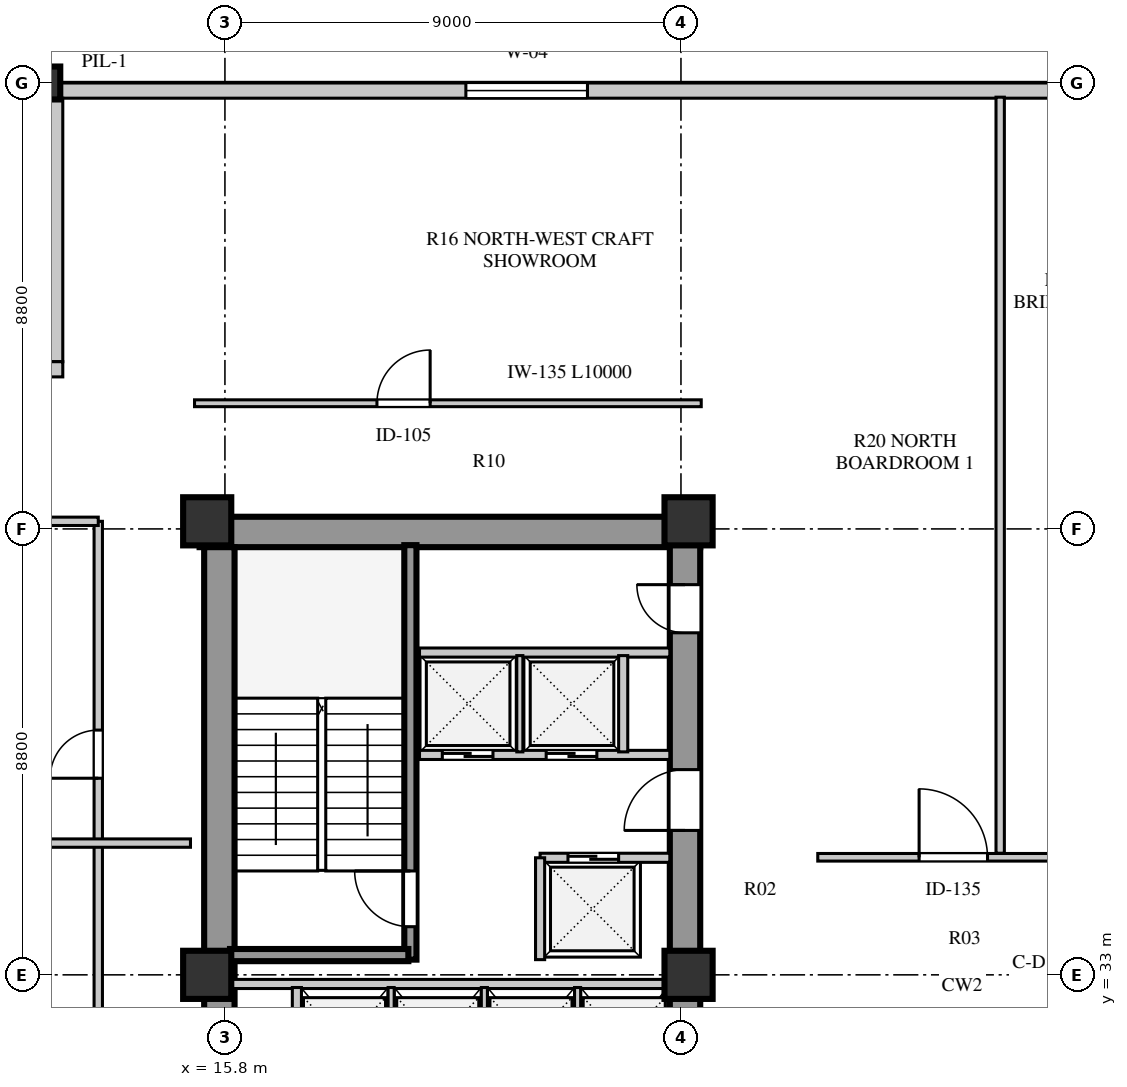
"""IFC4 building model, lengths in metres.
Left out: names, types, materials, properties, quantities, classifications, styles, units other than length and angle.
Written with IfcOpenShell. Run it as: python <this file> out.ifc"""

import sys

from ifc_helpers import new_model, si_unit, direction, frame, frame_2d, origin, origin_2d, place, context, subcontext, project, spatial, rectangle, extrude, element, fill, save


model = new_model("IFC4")
c1 = context("Model", 3, precision=1e-05, world=origin(), true_north=direction((0.0, 1.0)))
c2 = subcontext(c1, "Body", "Model", "MODEL_VIEW")
j1 = project(units=[si_unit("LENGTHUNIT", "METRE"), si_unit("PLANEANGLEUNIT", "RADIAN")], contexts=[c1])
p1 = place(None, origin())
s1 = spatial("IfcSite", under=j1, at=p1, CompositionType="ELEMENT")
p2 = place(p1, origin())
s2 = spatial("IfcBuilding", under=s1, at=p2, CompositionType="ELEMENT")
p3 = place(p2, frame((0.0, 0.0, 17.0)))
s3 = spatial("IfcBuildingStorey", under=s2, at=p3, CompositionType="ELEMENT", Elevation=17.0)
p4 = place(p3, frame((15.3, 41.74, 0.0), z_axis=(0.0, 0.0, 1.0), x_axis=(1.0, 0.0, 0.0)))
e1 = element("IfcWall", 1, at=p4, inside=s3, PredefinedType="SHEAR", context=c2, shape_type="SweptSolid", body=[
    extrude(rectangle(XDim=9.88, YDim=0.6, at=frame_2d((4.94, 0.0))), origin(), (0.0, 0.0, 1.0), 4.22),
])
p5 = place(p3, frame((15.69, 15.81, 0.0), z_axis=(0.0, 0.0, 1.0), x_axis=(0.0, 1.0, 0.0)))
e2 = element("IfcWall", 2, at=p5, inside=s3, PredefinedType="SHEAR", context=c2, shape_type="SweptSolid", body=[
    extrude(rectangle(XDim=25.63, YDim=0.6, at=frame_2d((12.815, 0.0))), origin(), (0.0, 0.0, 1.0), 4.22),
])
p6 = place(p3, frame((24.88, 15.74, 0.0), z_axis=(0.0, 0.0, 1.0), x_axis=(0.0, 1.0, 0.0)))
e3 = element("IfcWall", 3, at=p6, inside=s3, PredefinedType="SHEAR", context=c2, shape_type="SweptSolid", body=[
    extrude(rectangle(XDim=25.76, YDim=0.6, at=frame_2d((12.88, 0.0))), origin(), (0.0, 0.0, 1.0), 4.22),
])
p7 = place(p6, frame((1.61, 0.0, 0.0)))
e4 = element("IfcOpeningElement", 4, at=p7, cuts=e3, PredefinedType="OPENING", context=c2, shape_type="SweptSolid", body=[
    extrude(rectangle(XDim=1.2, YDim=2.1, at=frame_2d((0.6, 1.05))), frame((0.0, 0.31, 0.0), z_axis=(0.0, -1.0, 0.0), x_axis=(1.0, 0.0, 0.0)), (0.0, 0.0, 1.0), 0.62),
])
p8 = place(p6, frame((6.78, 0.0, 0.0)))
e5 = element("IfcOpeningElement", 5, at=p8, cuts=e3, PredefinedType="OPENING", context=c2, shape_type="SweptSolid", body=[
    extrude(rectangle(XDim=0.85, YDim=2.06, at=frame_2d((0.425, 1.03))), frame((0.0, 0.31, 0.0), z_axis=(0.0, -1.0, 0.0), x_axis=(1.0, 0.0, 0.0)), (0.0, 0.0, 1.0), 0.62),
])
p9 = place(p6, frame((12.11, 0.0, 0.0)))
e6 = element("IfcOpeningElement", 6, at=p9, cuts=e3, PredefinedType="OPENING", context=c2, shape_type="SweptSolid", body=[
    extrude(rectangle(XDim=1.5, YDim=2.12, at=frame_2d((0.75, 1.06))), frame((0.0, 0.31, 0.0), z_axis=(0.0, -1.0, 0.0), x_axis=(1.0, 0.0, 0.0)), (0.0, 0.0, 1.0), 0.62),
])
p10 = place(p6, frame((20.11, 0.0, 0.0)))
e7 = element("IfcOpeningElement", 7, at=p10, cuts=e3, PredefinedType="OPENING", context=c2, shape_type="SweptSolid", body=[
    extrude(rectangle(XDim=1.2, YDim=2.12, at=frame_2d((0.6, 1.06))), frame((0.0, 0.31, 0.0), z_axis=(0.0, -1.0, 0.0), x_axis=(1.0, 0.0, 0.0)), (0.0, 0.0, 1.0), 0.62),
])
p11 = place(p6, frame((24.01, 0.0, 0.0)))
e8 = element("IfcOpeningElement", 8, at=p11, cuts=e3, PredefinedType="OPENING", context=c2, shape_type="SweptSolid", body=[
    extrude(rectangle(XDim=0.95, YDim=2.1, at=frame_2d((0.475, 1.05))), frame((0.0, 0.31, 0.0), z_axis=(0.0, -1.0, 0.0), x_axis=(1.0, 0.0, 0.0)), (0.0, 0.0, 1.0), 0.62),
])
for number, where, z_axis, x_axis in (
    (9, (15.45, 33.0, 0.0), (0.0, 0.0, 1.0), (1.0, 0.0, 0.0)),
    (10, (15.45, 41.95, 0.0), (0.0, 0.0, 1.0), (1.0, 0.0, 0.0)),
    (11, (24.95, 33.0, 0.0), (0.0, 0.0, 1.0), (1.0, 0.0, 0.0)),
    (12, (24.95, 41.95, 0.0), (0.0, 0.0, 1.0), (1.0, 0.0, 0.0)),
):
    element("IfcColumn", number, at=place(p3, frame(where, z_axis=z_axis, x_axis=x_axis)), inside=s3, PredefinedType="COLUMN", context=c2, shape_type="SweptSolid", body=[
        extrude(rectangle(XDim=0.95, YDim=0.95, at=origin_2d()), origin(), (0.0, 0.0, 1.0), 4.22),
    ])
p12 = place(p3, frame((12.3, 50.6, 0.0), z_axis=(0.0, 0.0, 1.0), x_axis=(1.0, 0.0, 0.0)))
e13 = element("IfcColumn", 13, at=p12, inside=s3, PredefinedType="PILASTER", context=c2, shape_type="SweptSolid", body=[
    extrude(rectangle(XDim=0.5, YDim=0.65, at=origin_2d()), origin(), (0.0, 0.0, 1.0), 4.22),
])
p13 = place(p3, frame((46.3, 50.45, 0.0), z_axis=(0.0, 0.0, 1.0), x_axis=(-1.0, 0.0, 0.0)))
e14 = element("IfcWall", 14, at=p13, inside=s3, PredefinedType="STANDARD", context=c2, shape_type="SweptSolid", body=[
    extrude(rectangle(XDim=34.0, YDim=0.3, at=frame_2d((17.0, 0.0))), origin(), (0.0, 0.0, 1.0), 4.22),
])
p14 = place(p13, frame((23.345, 0.0, 0.8)))
e15 = element("IfcOpeningElement", 15, at=p14, cuts=e14, PredefinedType="OPENING", context=c2, shape_type="SweptSolid", body=[
    extrude(rectangle(XDim=2.4, YDim=2.05, at=frame_2d((1.2, 1.025))), frame((0.0, 0.16, 0.0), z_axis=(0.0, -1.0, 0.0), x_axis=(1.0, 0.0, 0.0)), (0.0, 0.0, 1.0), 0.32),
])
p15 = place(p13, frame((6.605, 0.0, 0.8)))
e16 = element("IfcOpeningElement", 16, at=p15, cuts=e14, PredefinedType="OPENING", context=c2, shape_type="SweptSolid", body=[
    extrude(rectangle(XDim=2.1, YDim=1.95, at=frame_2d((1.05, 0.975))), frame((0.0, 0.16, 0.0), z_axis=(0.0, -1.0, 0.0), x_axis=(1.0, 0.0, 0.0)), (0.0, 0.0, 1.0), 0.32),
])
p16 = place(p3, frame((12.45, 50.3, 0.0), z_axis=(0.0, 0.0, 1.0), x_axis=(0.0, -1.0, 0.0)))
e17 = element("IfcWall", 17, at=p16, inside=s3, PredefinedType="STANDARD", context=c2, shape_type="SweptSolid", body=[
    extrude(rectangle(XDim=5.2, YDim=0.3, at=frame_2d((2.6, 0.0))), origin(), (0.0, 0.0, 1.0), 4.22),
])
p17 = place(p3, frame((12.6, 44.95, 0.0), z_axis=(0.0, 0.0, 1.0), x_axis=(-1.0, 0.0, 0.0)))
e18 = element("IfcWall", 18, at=p17, inside=s3, PredefinedType="STANDARD", context=c2, shape_type="SweptSolid", body=[
    extrude(rectangle(XDim=5.8, YDim=0.3, at=frame_2d((2.9, 0.0))), origin(), (0.0, 0.0, 1.0), 4.22),
])
p18 = place(p3, frame((15.9, 32.82, 0.0), z_axis=(0.0, 0.0, 1.0), x_axis=(1.0, 0.0, 0.0)))
e19 = element("IfcWall", 19, at=p18, inside=s3, PredefinedType="SOLIDWALL", context=c2, shape_type="SweptSolid", body=[
    extrude(rectangle(XDim=8.68, YDim=0.18, at=frame_2d((4.34, 0.0))), origin(), (0.0, 0.0, 1.0), 3.42),
])
p19 = place(p3, frame((17.22, 30.7, 0.0), z_axis=(0.0, 0.0, 1.0), x_axis=(0.0, 1.0, 0.0)))
e20 = element("IfcWall", 20, at=p19, inside=s3, PredefinedType="SOLIDWALL", context=c2, shape_type="SweptSolid", body=[
    extrude(rectangle(XDim=2.05, YDim=0.18, at=frame_2d((1.025, 0.0))), origin(), (0.0, 0.0, 1.0), 4.22),
])
for number, where, z_axis, x_axis in (
    (21, (19.08, 30.7, 0.0), (0.0, 0.0, 1.0), (0.0, 1.0, 0.0)),
    (22, (20.92, 30.7, 0.0), (0.0, 0.0, 1.0), (0.0, 1.0, 0.0)),
    (23, (22.76, 30.7, 0.0), (0.0, 0.0, 1.0), (0.0, 1.0, 0.0)),
):
    element("IfcWall", number, at=place(p3, frame(where, z_axis=z_axis, x_axis=x_axis)), inside=s3, PredefinedType="PARTITIONING", context=c2, shape_type="SweptSolid", body=[
        extrude(rectangle(XDim=2.05, YDim=0.12, at=frame_2d((1.025, 0.0))), origin(), (0.0, 0.0, 1.0), 4.22),
    ])
p20 = place(p3, frame((19.46, 33.3, 0.0), z_axis=(0.0, 0.0, 1.0), x_axis=(0.0, 1.0, 0.0)))
e24 = element("IfcWall", 24, at=p20, inside=s3, PredefinedType="SHEAR", context=c2, shape_type="SweptSolid", body=[
    extrude(rectangle(XDim=8.18, YDim=0.24, at=frame_2d((4.09, 0.0))), origin(), (0.0, 0.0, 1.0), 4.5),
])
p21 = place(p20, frame((0.65, 0.0, 0.0)))
e25 = element("IfcOpeningElement", 25, at=p21, cuts=e24, PredefinedType="OPENING", context=c2, shape_type="SweptSolid", body=[
    extrude(rectangle(XDim=1.1, YDim=2.1, at=frame_2d((0.55, 1.05))), frame((0.0, 0.13, 0.0), z_axis=(0.0, -1.0, 0.0), x_axis=(1.0, 0.0, 0.0)), (0.0, 0.0, 1.0), 0.26),
])
p22 = place(p3, frame((15.9, 33.39, 0.0), z_axis=(0.0, 0.0, 1.0), x_axis=(1.0, 0.0, 0.0)))
e26 = element("IfcWall", 26, at=p22, inside=s3, PredefinedType="SHEAR", context=c2, shape_type="SweptSolid", body=[
    extrude(rectangle(XDim=3.52, YDim=0.24, at=frame_2d((1.76, 0.0))), origin(), (0.0, 0.0, 1.0), 4.5),
])
p23 = place(p3, frame((22.02, 35.31, 0.0), z_axis=(0.0, 0.0, 1.0), x_axis=(1.0, 0.0, 0.0)))
e27 = element("IfcWall", 27, at=p23, inside=s3, PredefinedType="SOLIDWALL", context=c2, shape_type="SweptSolid", body=[
    extrude(rectangle(XDim=2.56, YDim=0.18, at=frame_2d((1.28, 0.0))), origin(), (0.0, 0.0, 1.0), 4.22),
])
p24 = place(p23, frame((0.55, 0.0, 0.0)))
e28 = element("IfcOpeningElement", 28, at=p24, cuts=e27, PredefinedType="OPENING", context=c2, shape_type="SweptSolid", body=[
    extrude(rectangle(XDim=1.0, YDim=2.1, at=frame_2d((0.5, 1.05))), frame((0.0, 0.1, 0.0), z_axis=(0.0, -1.0, 0.0), x_axis=(1.0, 0.0, 0.0)), (0.0, 0.0, 1.0), 0.2),
])
p25 = place(p3, frame((22.02, 33.3, 0.0), z_axis=(0.0, 0.0, 1.0), x_axis=(0.0, 1.0, 0.0)))
e29 = element("IfcWall", 29, at=p25, inside=s3, PredefinedType="SOLIDWALL", context=c2, shape_type="SweptSolid", body=[
    extrude(rectangle(XDim=2.01, YDim=0.18, at=frame_2d((1.005, 0.0))), origin(), (0.0, 0.0, 1.0), 4.22),
])
p26 = place(p3, frame((19.64, 37.34, 0.0), z_axis=(0.0, 0.0, 1.0), x_axis=(1.0, 0.0, 0.0)))
e30 = element("IfcWall", 30, at=p26, inside=s3, PredefinedType="SOLIDWALL", context=c2, shape_type="SweptSolid", body=[
    extrude(rectangle(XDim=4.94, YDim=0.18, at=frame_2d((2.47, 0.0))), origin(), (0.0, 0.0, 1.0), 4.22),
])
p27 = place(p26, frame((0.45, 0.0, 0.0)))
e31 = element("IfcOpeningElement", 31, at=p27, cuts=e30, PredefinedType="OPENING", context=c2, shape_type="SweptSolid", body=[
    extrude(rectangle(XDim=1.0, YDim=2.1, at=frame_2d((0.5, 1.05))), frame((0.0, 0.1, 0.0), z_axis=(0.0, -1.0, 0.0), x_axis=(1.0, 0.0, 0.0)), (0.0, 0.0, 1.0), 0.2),
])
p28 = place(p26, frame((2.5, 0.0, 0.0)))
e32 = element("IfcOpeningElement", 32, at=p28, cuts=e30, PredefinedType="OPENING", context=c2, shape_type="SweptSolid", body=[
    extrude(rectangle(XDim=1.0, YDim=2.1, at=frame_2d((0.5, 1.05))), frame((0.0, 0.1, 0.0), z_axis=(0.0, -1.0, 0.0), x_axis=(1.0, 0.0, 0.0)), (0.0, 0.0, 1.0), 0.2),
])
p29 = place(p3, frame((19.64, 39.36, 0.0), z_axis=(0.0, 0.0, 1.0), x_axis=(1.0, 0.0, 0.0)))
e33 = element("IfcWall", 33, at=p29, inside=s3, PredefinedType="SOLIDWALL", context=c2, shape_type="SweptSolid", body=[
    extrude(rectangle(XDim=4.94, YDim=0.18, at=frame_2d((2.47, 0.0))), origin(), (0.0, 0.0, 1.0), 4.22),
])
p30 = place(p3, frame((21.62, 37.4, 0.0), z_axis=(0.0, 0.0, 1.0), x_axis=(0.0, 1.0, 0.0)))
e34 = element("IfcWall", 34, at=p30, inside=s3, PredefinedType="PARTITIONING", context=c2, shape_type="SweptSolid", body=[
    extrude(rectangle(XDim=1.9, YDim=0.12, at=frame_2d((0.95, 0.0))), origin(), (0.0, 0.0, 1.0), 4.22),
])
p31 = place(p3, frame((23.66, 37.4, 0.0), z_axis=(0.0, 0.0, 1.0), x_axis=(0.0, 1.0, 0.0)))
e35 = element("IfcWall", 35, at=p31, inside=s3, PredefinedType="SOLIDWALL", context=c2, shape_type="SweptSolid", body=[
    extrude(rectangle(XDim=1.9, YDim=0.18, at=frame_2d((0.95, 0.0))), origin(), (0.0, 0.0, 1.0), 4.22),
])
p32 = place(p3, frame((13.3, 15.25, 0.0), z_axis=(0.0, 0.0, 1.0), x_axis=(0.0, 1.0, 0.0)))
e36 = element("IfcWall", 36, at=p32, inside=s3, PredefinedType="PARTITIONING", context=c2, shape_type="SweptSolid", body=[
    extrude(rectangle(XDim=26.7, YDim=0.165, at=frame_2d((13.35, 0.0))), origin(), (0.0, 0.0, 1.0), 4.22),
])
p33 = place(p32, frame((1.3, 0.0, 0.0)))
e37 = element("IfcOpeningElement", 37, at=p33, cuts=e36, PredefinedType="OPENING", context=c2, shape_type="SweptSolid", body=[
    extrude(rectangle(XDim=0.95, YDim=2.08, at=frame_2d((0.475, 1.04))), frame((0.0, 0.093, 0.0), z_axis=(0.0, -1.0, 0.0), x_axis=(1.0, 0.0, 0.0)), (0.0, 0.0, 1.0), 0.185),
])
p34 = place(p32, frame((7.63, 0.0, 0.0)))
e38 = element("IfcOpeningElement", 38, at=p34, cuts=e36, PredefinedType="OPENING", context=c2, shape_type="SweptSolid", body=[
    extrude(rectangle(XDim=0.95, YDim=2.08, at=frame_2d((0.475, 1.04))), frame((0.0, 0.093, 0.0), z_axis=(0.0, -1.0, 0.0), x_axis=(1.0, 0.0, 0.0)), (0.0, 0.0, 1.0), 0.185),
])
p35 = place(p32, frame((14.63, 0.0, 0.0)))
e39 = element("IfcOpeningElement", 39, at=p35, cuts=e36, PredefinedType="OPENING", context=c2, shape_type="SweptSolid", body=[
    extrude(rectangle(XDim=0.95, YDim=2.08, at=frame_2d((0.475, 1.04))), frame((0.0, 0.093, 0.0), z_axis=(0.0, -1.0, 0.0), x_axis=(1.0, 0.0, 0.0)), (0.0, 0.0, 1.0), 0.185),
])
p36 = place(p32, frame((21.63, 0.0, 0.0)))
e40 = element("IfcOpeningElement", 40, at=p36, cuts=e36, PredefinedType="OPENING", context=c2, shape_type="SweptSolid", body=[
    extrude(rectangle(XDim=0.95, YDim=2.08, at=frame_2d((0.475, 1.04))), frame((0.0, 0.093, 0.0), z_axis=(0.0, -1.0, 0.0), x_axis=(1.0, 0.0, 0.0)), (0.0, 0.0, 1.0), 0.185),
])
p37 = place(p3, frame((6.88, 41.95, 0.0), z_axis=(0.0, 0.0, 1.0), x_axis=(1.0, 0.0, 0.0)))
e41 = element("IfcWall", 41, at=p37, inside=s3, PredefinedType="PARTITIONING", context=c2, shape_type="SweptSolid", body=[
    extrude(rectangle(XDim=6.42, YDim=0.165, at=frame_2d((3.21, 0.0))), origin(), (0.0, 0.0, 1.0), 3.72),
])
p38 = place(p3, frame((15.2, 44.28, 0.0), z_axis=(0.0, 0.0, 1.0), x_axis=(1.0, 0.0, 0.0)))
e42 = element("IfcWall", 42, at=p38, inside=s3, PredefinedType="PARTITIONING", context=c2, shape_type="SweptSolid", body=[
    extrude(rectangle(XDim=10.0, YDim=0.135, at=frame_2d((5.0, 0.0))), origin(), (0.0, 0.0, 1.0), 4.22),
])
p39 = place(p38, frame((3.6, 0.0, 0.0)))
e43 = element("IfcOpeningElement", 43, at=p39, cuts=e42, PredefinedType="OPENING", context=c2, shape_type="SweptSolid", body=[
    extrude(rectangle(XDim=1.05, YDim=2.1, at=frame_2d((0.525, 1.05))), frame((0.0, 0.078, 0.0), z_axis=(0.0, -1.0, 0.0), x_axis=(1.0, 0.0, 0.0)), (0.0, 0.0, 1.0), 0.155),
])
p40 = place(p3, frame((27.5, 35.32, 0.0), z_axis=(0.0, 0.0, 1.0), x_axis=(1.0, 0.0, 0.0)))
e44 = element("IfcWall", 44, at=p40, inside=s3, PredefinedType="PARTITIONING", context=c2, shape_type="SweptSolid", body=[
    extrude(rectangle(XDim=7.22, YDim=0.15, at=frame_2d((3.61, 0.0))), origin(), (0.0, 0.0, 1.0), 4.22),
])
p41 = place(p40, frame((5.0, 0.0, 0.0)))
e45 = element("IfcOpeningElement", 45, at=p41, cuts=e44, PredefinedType="OPENING", context=c2, shape_type="SweptSolid", body=[
    extrude(rectangle(XDim=0.95, YDim=2.08, at=frame_2d((0.475, 1.04))), frame((0.0, 0.085, 0.0), z_axis=(0.0, -1.0, 0.0), x_axis=(1.0, 0.0, 0.0)), (0.0, 0.0, 1.0), 0.17),
])
p42 = place(p40, frame((2.0, 0.0, 0.0)))
e46 = element("IfcOpeningElement", 46, at=p42, cuts=e44, PredefinedType="OPENING", context=c2, shape_type="SweptSolid", body=[
    extrude(rectangle(XDim=1.35, YDim=2.1, at=frame_2d((0.675, 1.05))), frame((0.0, 0.085, 0.0), z_axis=(0.0, -1.0, 0.0), x_axis=(1.0, 0.0, 0.0)), (0.0, 0.0, 1.0), 0.17),
])
p43 = place(p3, frame((31.1, 35.4, 0.0), z_axis=(0.0, 0.0, 1.0), x_axis=(0.0, 1.0, 0.0)))
e47 = element("IfcWall", 47, at=p43, inside=s3, PredefinedType="PARTITIONING", context=c2, shape_type="SweptSolid", body=[
    extrude(rectangle(XDim=14.92, YDim=0.165, at=frame_2d((7.46, 0.0))), origin(), (0.0, 0.0, 1.0), 4.22),
])
p44 = place(p3, frame((6.88, 35.6, 0.0), z_axis=(0.0, 0.0, 1.0), x_axis=(1.0, 0.0, 0.0)))
e48 = element("IfcWall", 48, at=p44, inside=s3, PredefinedType="PARTITIONING", context=c2, shape_type="SweptSolid", body=[
    extrude(rectangle(XDim=8.24, YDim=0.165, at=frame_2d((4.12, 0.0))), origin(), (0.0, 0.0, 1.0), 4.22),
])
p45 = place(p14, origin())
e49 = element("IfcWindow", 49, at=p45, inside=s3, PartitioningType="SINGLE_PANEL", PredefinedType="WINDOW", context=c2, shape_type="SweptSolid", body=[
    extrude(rectangle(XDim=2.4, YDim=2.05, at=frame_2d((1.2, 1.025))), frame((0.0, 0.03, 0.0), z_axis=(0.0, -1.0, 0.0), x_axis=(1.0, 0.0, 0.0)), (0.0, 0.0, 1.0), 0.06),
])
fill(e15, e49)
p46 = place(p21, origin())
e50 = element("IfcDoor", 50, at=p46, inside=s3, OperationType="SINGLE_SWING_RIGHT", PredefinedType="DOOR", context=c2, shape_type="SweptSolid", body=[
    extrude(rectangle(XDim=1.1, YDim=2.1, at=frame_2d((0.55, 1.05))), frame((0.0, 0.025, 0.0), z_axis=(0.0, -1.0, 0.0), x_axis=(1.0, 0.0, 0.0)), (0.0, 0.0, 1.0), 0.05),
])
fill(e25, e50)
p47 = place(p10, frame((1.2, 0.0, 0.0), z_axis=(0.0, 0.0, 1.0), x_axis=(-1.0, 0.0, 0.0)))
e51 = element("IfcDoor", 51, at=p47, inside=s3, OperationType="SINGLE_SWING_RIGHT", PredefinedType="DOOR", context=c2, shape_type="SweptSolid", body=[
    extrude(rectangle(XDim=1.2, YDim=2.12, at=frame_2d((0.6, 1.06))), frame((0.0, 0.025, 0.0), z_axis=(0.0, -1.0, 0.0), x_axis=(1.0, 0.0, 0.0)), (0.0, 0.0, 1.0), 0.05),
])
fill(e7, e51)
p48 = place(p27, frame((1.0, 0.0, 0.0), z_axis=(0.0, 0.0, 1.0), x_axis=(-1.0, 0.0, 0.0)))
e52 = element("IfcDoor", 52, at=p48, inside=s3, OperationType="DOUBLE_DOOR_SLIDING", PredefinedType="DOOR", context=c2, shape_type="SweptSolid", body=[
    extrude(rectangle(XDim=1.0, YDim=2.1, at=frame_2d((0.5, 1.05))), frame((0.0, 0.025, 0.0), z_axis=(0.0, -1.0, 0.0), x_axis=(1.0, 0.0, 0.0)), (0.0, 0.0, 1.0), 0.05),
])
fill(e31, e52)
p49 = place(p28, frame((1.0, 0.0, 0.0), z_axis=(0.0, 0.0, 1.0), x_axis=(-1.0, 0.0, 0.0)))
e53 = element("IfcDoor", 53, at=p49, inside=s3, OperationType="DOUBLE_DOOR_SLIDING", PredefinedType="DOOR", context=c2, shape_type="SweptSolid", body=[
    extrude(rectangle(XDim=1.0, YDim=2.1, at=frame_2d((0.5, 1.05))), frame((0.0, 0.025, 0.0), z_axis=(0.0, -1.0, 0.0), x_axis=(1.0, 0.0, 0.0)), (0.0, 0.0, 1.0), 0.05),
])
fill(e32, e53)
p50 = place(p24, origin())
e54 = element("IfcDoor", 54, at=p50, inside=s3, OperationType="DOUBLE_DOOR_SLIDING", PredefinedType="DOOR", context=c2, shape_type="SweptSolid", body=[
    extrude(rectangle(XDim=1.0, YDim=2.1, at=frame_2d((0.5, 1.05))), frame((0.0, 0.025, 0.0), z_axis=(0.0, -1.0, 0.0), x_axis=(1.0, 0.0, 0.0)), (0.0, 0.0, 1.0), 0.05),
])
fill(e28, e54)
p51 = place(p11, frame((0.95, 0.0, 0.0), z_axis=(0.0, 0.0, 1.0), x_axis=(-1.0, 0.0, 0.0)))
e55 = element("IfcDoor", 55, at=p51, inside=s3, OperationType="SINGLE_SWING_LEFT", PredefinedType="DOOR", context=c2, shape_type="SweptSolid", body=[
    extrude(rectangle(XDim=0.95, YDim=2.1, at=frame_2d((0.475, 1.05))), frame((0.0, 0.025, 0.0), z_axis=(0.0, -1.0, 0.0), x_axis=(1.0, 0.0, 0.0)), (0.0, 0.0, 1.0), 0.05),
])
fill(e8, e55)
p52 = place(p36, origin())
e56 = element("IfcDoor", 56, at=p52, inside=s3, OperationType="SINGLE_SWING_LEFT", PredefinedType="DOOR", context=c2, shape_type="SweptSolid", body=[
    extrude(rectangle(XDim=0.95, YDim=2.08, at=frame_2d((0.475, 1.04))), frame((0.0, 0.025, 0.0), z_axis=(0.0, -1.0, 0.0), x_axis=(1.0, 0.0, 0.0)), (0.0, 0.0, 1.0), 0.05),
])
fill(e40, e56)
p53 = place(p39, origin())
e57 = element("IfcDoor", 57, at=p53, inside=s3, OperationType="SINGLE_SWING_RIGHT", PredefinedType="DOOR", context=c2, shape_type="SweptSolid", body=[
    extrude(rectangle(XDim=1.05, YDim=2.1, at=frame_2d((0.525, 1.05))), frame((0.0, 0.025, 0.0), z_axis=(0.0, -1.0, 0.0), x_axis=(1.0, 0.0, 0.0)), (0.0, 0.0, 1.0), 0.05),
])
fill(e43, e57)
p54 = place(p42, origin())
e58 = element("IfcDoor", 58, at=p54, inside=s3, OperationType="SINGLE_SWING_LEFT", PredefinedType="DOOR", context=c2, shape_type="SweptSolid", body=[
    extrude(rectangle(XDim=1.35, YDim=2.1, at=frame_2d((0.675, 1.05))), frame((0.0, 0.025, 0.0), z_axis=(0.0, -1.0, 0.0), x_axis=(1.0, 0.0, 0.0)), (0.0, 0.0, 1.0), 0.05),
])
fill(e46, e58)
save(model, sys.argv[1])
